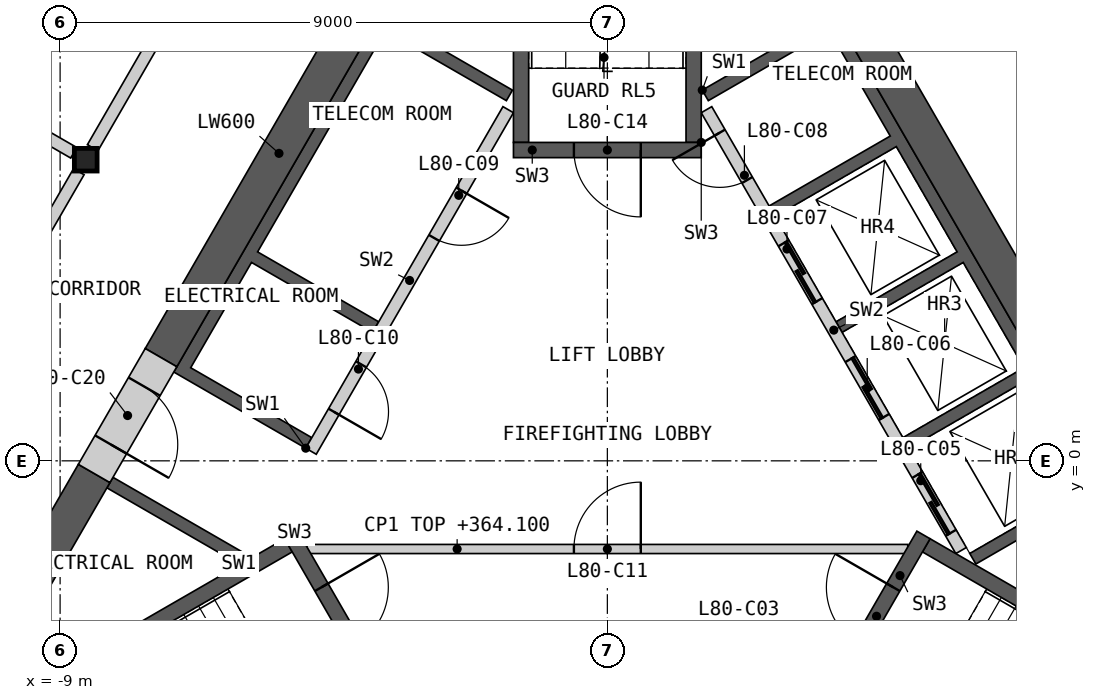
"""IFC4 building model, lengths in metres.
Left out: names, types, materials, properties, quantities, classifications, styles, units other than length and angle.
Written with IfcOpenShell. Run it as: python <this file> out.ifc"""

import sys

from ifc_helpers import new_model, si_unit, direction, frame, frame_2d, origin, origin_2d, place, context, subcontext, project, spatial, polyline, rectangle, i_section, outline, extrude, element, fill, save


model = new_model("IFC4")
c1 = context("Model", 3, precision=1e-05, world=origin(), true_north=direction((0.0, 1.0)))
c2 = subcontext(c1, "Body", "Model", "MODEL_VIEW")
j1 = project(units=[si_unit("LENGTHUNIT", "METRE"), si_unit("PLANEANGLEUNIT", "RADIAN")], contexts=[c1])
p1 = place(None, origin())
s1 = spatial("IfcSite", under=j1, at=p1, CompositionType="ELEMENT")
p2 = place(p1, origin())
s2 = spatial("IfcBuilding", under=s1, at=p2, CompositionType="ELEMENT")
p3 = place(p2, frame((0.0, 0.0, 361.0)))
s3 = spatial("IfcBuildingStorey", under=s2, at=p3, CompositionType="ELEMENT", Elevation=361.0)
p4 = place(p3, frame((-8.578, 4.953, 0.0), z_axis=(0.0, 0.0, 1.0), x_axis=(1.0, 0.0, 0.0)))
e1 = element("IfcColumn", 1, at=p4, inside=s3, PredefinedType="COLUMN", context=c2, shape_type="SweptSolid", body=[
    extrude(i_section(OverallWidth=0.374, OverallDepth=0.372, WebThickness=0.016, FlangeThickness=0.026, at=origin_2d()), origin(), (0.0, 0.0, 1.0), 3.4),
])
p5 = place(p3, origin())
e2 = element("IfcWall", 2, at=p5, inside=s3, PredefinedType="SHEAR", context=c2, shape_type="SweptSolid", body=[
    extrude(outline(polyline([(1.561, 6.097), (3.731, 7.35), (8.231, -0.444), (6.061, -1.697), (5.96, -1.524), (7.952, -0.374), (6.952, 1.358), (4.96, 0.208), (4.861, 0.381), (6.852, 1.531), (5.852, 3.263), (3.861, 2.113), (3.76, 2.287), (5.752, 3.437), (4.752, 5.169), (2.76, 4.019), (2.66, 4.192), (4.652, 5.342), (3.652, 7.074), (1.66, 5.924), (1.561, 6.097)])), origin(), (0.0, 0.0, 1.0), 3.1),
])
p6 = place(p3, frame((5.817, -1.476, 0.0), z_axis=(0.0, 0.0, 1.0), x_axis=(-0.500002616675, 0.866023893041, 0.0)))
e3 = element("IfcWall", 3, at=p6, inside=s3, PredefinedType="SOLIDWALL", context=c2, shape_type="SweptSolid", body=[
    extrude(rectangle(XDim=8.373, YDim=0.2, at=frame_2d((4.187, 0.0))), origin(), (0.0, 0.0, 1.0), 3.1),
])
p7 = place(p6, frame((0.337, 0.0, 0.0)))
e4 = element("IfcOpeningElement", 4, at=p7, cuts=e3, PredefinedType="OPENING", context=c2, shape_type="SweptSolid", body=[
    extrude(rectangle(XDim=1.1, YDim=2.1, at=frame_2d((0.55, 1.05))), frame((0.0, 0.11, 0.0), z_axis=(0.0, -1.0, 0.0), x_axis=(1.0, 0.0, 0.0)), (0.0, 0.0, 1.0), 0.22),
])
p8 = place(p6, frame((2.537, 0.0, 0.0)))
e5 = element("IfcOpeningElement", 5, at=p8, cuts=e3, PredefinedType="OPENING", context=c2, shape_type="SweptSolid", body=[
    extrude(rectangle(XDim=1.1, YDim=2.1, at=frame_2d((0.55, 1.05))), frame((0.0, 0.11, 0.0), z_axis=(0.0, -1.0, 0.0), x_axis=(1.0, 0.0, 0.0)), (0.0, 0.0, 1.0), 0.22),
])
p9 = place(p6, frame((4.737, 0.0, 0.0)))
e6 = element("IfcOpeningElement", 6, at=p9, cuts=e3, PredefinedType="OPENING", context=c2, shape_type="SweptSolid", body=[
    extrude(rectangle(XDim=1.1, YDim=2.1, at=frame_2d((0.55, 1.05))), frame((0.0, 0.11, 0.0), z_axis=(0.0, -1.0, 0.0), x_axis=(1.0, 0.0, 0.0)), (0.0, 0.0, 1.0), 0.22),
])
p10 = place(p6, frame((7.037, 0.0, 0.0)))
e7 = element("IfcOpeningElement", 7, at=p10, cuts=e3, PredefinedType="OPENING", context=c2, shape_type="SweptSolid", body=[
    extrude(rectangle(XDim=0.9, YDim=2.1, at=frame_2d((0.45, 1.05))), frame((0.0, 0.11, 0.0), z_axis=(0.0, -1.0, 0.0), x_axis=(1.0, 0.0, 0.0)), (0.0, 0.0, 1.0), 0.22),
])
p11 = place(p3, origin())
e8 = element("IfcWall", 8, at=p11, inside=s3, PredefinedType="SHEAR", context=c2, shape_type="SweptSolid", body=[
    extrude(outline(polyline([(-6.061, -1.697), (-8.231, -0.444), (-8.131, -0.271), (-5.96, -1.524), (-6.061, -1.697)])), origin(), (0.0, 0.0, 1.0), 3.1),
])
p12 = place(p3, origin())
e9 = element("IfcWall", 9, at=p12, inside=s3, PredefinedType="SHEAR", context=c2, shape_type="SweptSolid", body=[
    extrude(outline(polyline([(-4.96, 0.208), (-7.131, 1.461), (-3.731, 7.35), (-1.561, 6.097), (-1.66, 5.924), (-3.652, 7.074), (-5.752, 3.437), (-3.76, 2.287), (-3.861, 2.113), (-5.852, 3.263), (-6.852, 1.531), (-4.861, 0.381), (-4.96, 0.208)])), origin(), (0.0, 0.0, 1.0), 3.1),
])
p13 = place(p3, frame((-1.631, 5.776, 0.0), z_axis=(0.0, 0.0, 1.0), x_axis=(-0.499992876559, -0.866029516466, 0.0)))
e10 = element("IfcWall", 10, at=p13, inside=s3, PredefinedType="SOLIDWALL", context=c2, shape_type="SweptSolid", body=[
    extrude(rectangle(XDim=6.486, YDim=0.2, at=frame_2d((3.243, 0.0))), origin(), (0.0, 0.0, 1.0), 3.1),
])
p14 = place(p13, frame((1.537, 0.0, 0.0)))
e11 = element("IfcOpeningElement", 11, at=p14, cuts=e10, PredefinedType="OPENING", context=c2, shape_type="SweptSolid", body=[
    extrude(rectangle(XDim=0.9, YDim=2.1, at=frame_2d((0.45, 1.05))), frame((0.0, 0.11, 0.0), z_axis=(0.0, -1.0, 0.0), x_axis=(1.0, 0.0, 0.0)), (0.0, 0.0, 1.0), 0.22),
])
p15 = place(p13, frame((4.837, 0.0, 0.0)))
e12 = element("IfcOpeningElement", 12, at=p15, cuts=e10, PredefinedType="OPENING", context=c2, shape_type="SweptSolid", body=[
    extrude(rectangle(XDim=0.9, YDim=2.1, at=frame_2d((0.45, 1.05))), frame((0.0, 0.11, 0.0), z_axis=(0.0, -1.0, 0.0), x_axis=(1.0, 0.0, 0.0)), (0.0, 0.0, 1.0), 0.22),
])
p16 = place(p3, frame((-4.941, -1.45, 0.0), z_axis=(0.0, 0.0, 1.0), x_axis=(1.0, 0.0, 0.0)))
e13 = element("IfcWall", 13, at=p16, inside=s3, PredefinedType="PARTITIONING", context=c2, shape_type="SweptSolid", body=[
    extrude(rectangle(XDim=9.882, YDim=0.15, at=frame_2d((4.941, 0.0))), origin(), (0.0, 0.0, 1.0), 3.1),
])
p17 = place(p16, frame((4.391, 0.0, 0.0)))
e14 = element("IfcOpeningElement", 14, at=p17, cuts=e13, PredefinedType="OPENING", context=c2, shape_type="SweptSolid", body=[
    extrude(rectangle(XDim=1.1, YDim=2.1, at=frame_2d((0.55, 1.05))), frame((0.0, 0.085, 0.0), z_axis=(0.0, -1.0, 0.0), x_axis=(1.0, 0.0, 0.0)), (0.0, 0.0, 1.0), 0.17),
])
p18 = place(p3, origin())
e15 = element("IfcWall", 15, at=p18, inside=s3, PredefinedType="SHEAR", context=c2, shape_type="SweptSolid", body=[
    extrude(outline(polyline([(-5.307, -1.281), (-10.374, -4.206), (-10.032, -4.298), (-5.182, -1.498), (-5.307, -1.281)])), origin(), (0.0, 0.0, 1.0), 3.1),
])
p19 = place(p3, frame((-5.199, -1.219, 0.0), z_axis=(0.0, 0.0, 1.0), x_axis=(0.499982516597, -0.866035497597, 0.0)))
e16 = element("IfcWall", 16, at=p19, inside=s3, PredefinedType="SHEAR", context=c2, shape_type="SweptSolid", body=[
    extrude(rectangle(XDim=3.088, YDim=0.25, at=frame_2d((1.544, 0.0))), origin(), (0.0, 0.0, 1.0), 3.1),
])
p20 = place(p19, frame((0.994, 0.0, 0.0)))
e17 = element("IfcOpeningElement", 17, at=p20, cuts=e16, PredefinedType="OPENING", context=c2, shape_type="SweptSolid", body=[
    extrude(rectangle(XDim=1.1, YDim=2.1, at=frame_2d((0.55, 1.05))), frame((0.0, 0.135, 0.0), z_axis=(0.0, -1.0, 0.0), x_axis=(1.0, 0.0, 0.0)), (0.0, 0.0, 1.0), 0.27),
])
p21 = place(p3, origin())
e18 = element("IfcWall", 18, at=p21, inside=s3, PredefinedType="SHEAR", context=c2, shape_type="SweptSolid", body=[
    extrude(outline(polyline([(10.032, -4.298), (10.374, -4.206), (5.307, -1.281), (5.182, -1.498), (10.032, -4.298)])), origin(), (0.0, 0.0, 1.0), 3.1),
])
p22 = place(p3, frame((3.655, -3.893, 0.0), z_axis=(0.0, 0.0, 1.0), x_axis=(0.499982516597, 0.866035497597, 0.0)))
e19 = element("IfcWall", 19, at=p22, inside=s3, PredefinedType="SHEAR", context=c2, shape_type="SweptSolid", body=[
    extrude(rectangle(XDim=3.088, YDim=0.25, at=frame_2d((1.544, 0.0))), origin(), (0.0, 0.0, 1.0), 3.1),
])
p23 = place(p22, frame((0.994, 0.0, 0.0)))
e20 = element("IfcOpeningElement", 20, at=p23, cuts=e19, PredefinedType="OPENING", context=c2, shape_type="SweptSolid", body=[
    extrude(rectangle(XDim=1.1, YDim=2.1, at=frame_2d((0.55, 1.05))), frame((0.0, 0.135, 0.0), z_axis=(0.0, -1.0, 0.0), x_axis=(1.0, 0.0, 0.0)), (0.0, 0.0, 1.0), 0.27),
])
p24 = place(p3, origin())
e21 = element("IfcWall", 21, at=p24, inside=s3, PredefinedType="SHEAR", context=c2, shape_type="SweptSolid", body=[
    extrude(outline(polyline([(1.544, 5.237), (1.544, 11.087), (1.294, 10.837), (1.294, 5.237), (1.544, 5.237)])), origin(), (0.0, 0.0, 1.0), 3.1),
])
p25 = place(p3, origin())
e22 = element("IfcWall", 22, at=p25, inside=s3, PredefinedType="SHEAR", context=c2, shape_type="SweptSolid", body=[
    extrude(outline(polyline([(-1.294, 10.837), (-1.544, 11.087), (-1.544, 5.237), (-1.294, 5.237), (-1.294, 10.837)])), origin(), (0.0, 0.0, 1.0), 3.1),
])
p26 = place(p3, frame((1.544, 5.112, 0.0), z_axis=(0.0, 0.0, 1.0), x_axis=(-1.0, 0.0, 0.0)))
e23 = element("IfcWall", 23, at=p26, inside=s3, PredefinedType="SHEAR", context=c2, shape_type="SweptSolid", body=[
    extrude(rectangle(XDim=3.088, YDim=0.25, at=frame_2d((1.544, 0.0))), origin(), (0.0, 0.0, 1.0), 3.1),
])
p27 = place(p26, frame((0.994, 0.0, 0.0)))
e24 = element("IfcOpeningElement", 24, at=p27, cuts=e23, PredefinedType="OPENING", context=c2, shape_type="SweptSolid", body=[
    extrude(rectangle(XDim=1.1, YDim=2.1, at=frame_2d((0.55, 1.05))), frame((0.0, 0.135, 0.0), z_axis=(0.0, -1.0, 0.0), x_axis=(1.0, 0.0, 0.0)), (0.0, 0.0, 1.0), 0.27),
])
p28 = place(p3, frame((8.686, -0.634, 0.0), z_axis=(0.0, 0.0, 1.0), x_axis=(-0.50001836461, 0.866014800712, 0.0)))
e25 = element("IfcWall", 25, at=p28, inside=s3, PredefinedType="SHEAR", context=c2, shape_type="SweptSolid", body=[
    extrude(rectangle(XDim=10.451, YDim=0.6, at=frame_2d((5.225, 0.0))), origin(), (0.0, 0.0, 1.0), 3.1),
])
p29 = place(p3, frame((-3.461, 8.417, 0.0), z_axis=(0.0, 0.0, 1.0), x_axis=(-0.50000391502, -0.866023143435, 0.0)))
e26 = element("IfcWall", 26, at=p29, inside=s3, PredefinedType="SHEAR", context=c2, shape_type="SweptSolid", body=[
    extrude(rectangle(XDim=7.759, YDim=0.6, at=frame_2d((3.879, 0.0))), origin(), (0.0, 0.0, 1.0), 3.1),
])
p30 = place(p3, frame((-8.44, -0.208, 0.0), z_axis=(0.0, 0.0, 1.0), x_axis=(-0.500007425856, -0.866021116422, 0.0)))
e27 = element("IfcWall", 27, at=p30, inside=s3, PredefinedType="SHEAR", context=c2, shape_type="SweptSolid", body=[
    extrude(rectangle(XDim=4.969, YDim=0.6, at=frame_2d((2.484, 0.0))), origin(), (0.0, 0.0, 1.0), 3.1),
])
p31 = place(p3, frame((-7.34, 1.698, 0.0), z_axis=(0.0, 0.0, 1.0), x_axis=(-0.50002983664, -0.866008176907, 0.0)))
e28 = element("IfcWall", 28, at=p31, inside=s3, PredefinedType="SHEAR", context=c2, shape_type="SweptSolid", body=[
    extrude(rectangle(XDim=2.2, YDim=0.6, at=frame_2d((1.1, 0.0))), origin(), (0.0, 0.0, 1.0), 3.1),
])
p32 = place(p31, frame((0.55, 0.0, 0.0)))
e29 = element("IfcOpeningElement", 29, at=p32, cuts=e28, PredefinedType="OPENING", context=c2, shape_type="SweptSolid", body=[
    extrude(rectangle(XDim=1.1, YDim=2.1, at=frame_2d((0.55, 1.05))), frame((0.0, 0.31, 0.0), z_axis=(0.0, -1.0, 0.0), x_axis=(1.0, 0.0, 0.0)), (0.0, 0.0, 1.0), 0.62),
])
p33 = place(p3, frame((-8.465, 5.15, 0.0), z_axis=(0.0, 0.0, 1.0), x_axis=(0.499992155518, 0.866029932751, 0.0)))
e30 = element("IfcWall", 30, at=p33, inside=s3, PredefinedType="PARTITIONING", context=c2, shape_type="SweptSolid", body=[
    extrude(rectangle(XDim=8.123, YDim=0.2, at=frame_2d((4.062, 0.0))), origin(), (0.0, 0.0, 1.0), 3.1),
])
p34 = place(p33, frame((3.587, 0.0, 0.0)))
e31 = element("IfcOpeningElement", 31, at=p34, cuts=e30, PredefinedType="OPENING", context=c2, shape_type="SweptSolid", body=[
    extrude(rectangle(XDim=0.95, YDim=2.1, at=frame_2d((0.475, 1.05))), frame((0.0, 0.11, 0.0), z_axis=(0.0, -1.0, 0.0), x_axis=(1.0, 0.0, 0.0)), (0.0, 0.0, 1.0), 0.22),
])
p35 = place(p3, frame((4.403, 12.185, 0.0), z_axis=(0.0, 0.0, 1.0), x_axis=(0.499992155518, -0.866029932751, 0.0)))
e32 = element("IfcWall", 32, at=p35, inside=s3, PredefinedType="PARTITIONING", context=c2, shape_type="SweptSolid", body=[
    extrude(rectangle(XDim=8.123, YDim=0.2, at=frame_2d((4.062, 0.0))), origin(), (0.0, 0.0, 1.0), 3.1),
])
p36 = place(p35, frame((3.762, 0.0, 0.0)))
e33 = element("IfcOpeningElement", 33, at=p36, cuts=e32, PredefinedType="OPENING", context=c2, shape_type="SweptSolid", body=[
    extrude(rectangle(XDim=1.0, YDim=2.1, at=frame_2d((0.5, 1.05))), frame((0.0, 0.11, 0.0), z_axis=(0.0, -1.0, 0.0), x_axis=(1.0, 0.0, 0.0)), (0.0, 0.0, 1.0), 0.22),
])
p37 = place(p3, frame((-12.754, -2.279, 0.0), z_axis=(0.0, 0.0, 1.0), x_axis=(0.500001682468, 0.866024432409, 0.0)))
e34 = element("IfcWall", 34, at=p37, inside=s3, PredefinedType="PARTITIONING", context=c2, shape_type="SweptSolid", body=[
    extrude(rectangle(XDim=8.124, YDim=0.2, at=frame_2d((4.062, 0.0))), origin(), (0.0, 0.0, 1.0), 3.1),
])
p38 = place(p37, frame((3.762, 0.0, 0.0)))
e35 = element("IfcOpeningElement", 35, at=p38, cuts=e34, PredefinedType="OPENING", context=c2, shape_type="SweptSolid", body=[
    extrude(rectangle(XDim=1.0, YDim=2.1, at=frame_2d((0.5, 1.05))), frame((0.0, 0.11, 0.0), z_axis=(0.0, -1.0, 0.0), x_axis=(1.0, 0.0, 0.0)), (0.0, 0.0, 1.0), 0.22),
])
p39 = place(p3, frame((-11.473, 6.74, 0.0), z_axis=(0.0, 0.0, 1.0), x_axis=(0.499993542657, 0.866029131901, 0.0)))
e36 = element("IfcWall", 36, at=p39, inside=s3, PredefinedType="PARTITIONING", context=c2, shape_type="SweptSolid", body=[
    extrude(rectangle(XDim=14.994, YDim=0.2, at=frame_2d((7.497, 0.0))), origin(), (0.0, 0.0, 1.0), 2.33),
])
p40 = place(p39, frame((10.383, 0.0, 0.0)))
e37 = element("IfcOpeningElement", 37, at=p40, cuts=e36, PredefinedType="OPENING", context=c2, shape_type="SweptSolid", body=[
    extrude(rectangle(XDim=0.95, YDim=2.1, at=frame_2d((0.475, 1.05))), frame((0.0, 0.11, 0.0), z_axis=(0.0, -1.0, 0.0), x_axis=(1.0, 0.0, 0.0)), (0.0, 0.0, 1.0), 0.22),
])
p41 = place(p3, frame((-18.869, 10.894, 0.0), z_axis=(0.0, 0.0, 1.0), x_axis=(0.866023724155, -0.500002909193, 0.0)))
e38 = element("IfcWall", 38, at=p41, inside=s3, PredefinedType="PARTITIONING", context=c2, shape_type="SweptSolid", body=[
    extrude(rectangle(XDim=11.655, YDim=0.2, at=frame_2d((5.827, 0.0))), origin(), (0.0, 0.0, 1.0), 2.33),
])
p42 = place(p7, origin())
e39 = element("IfcDoor", 39, at=p42, inside=s3, OperationType="SLIDING_TO_LEFT", PredefinedType="DOOR", context=c2, shape_type="SweptSolid", body=[
    extrude(rectangle(XDim=1.1, YDim=2.1, at=frame_2d((0.55, 1.05))), frame((0.0, 0.025, 0.0), z_axis=(0.0, -1.0, 0.0), x_axis=(1.0, 0.0, 0.0)), (0.0, 0.0, 1.0), 0.05),
])
fill(e4, e39)
p43 = place(p8, origin())
e40 = element("IfcDoor", 40, at=p43, inside=s3, OperationType="SLIDING_TO_LEFT", PredefinedType="DOOR", context=c2, shape_type="SweptSolid", body=[
    extrude(rectangle(XDim=1.1, YDim=2.1, at=frame_2d((0.55, 1.05))), frame((0.0, 0.025, 0.0), z_axis=(0.0, -1.0, 0.0), x_axis=(1.0, 0.0, 0.0)), (0.0, 0.0, 1.0), 0.05),
])
fill(e5, e40)
p44 = place(p9, origin())
e41 = element("IfcDoor", 41, at=p44, inside=s3, OperationType="SLIDING_TO_LEFT", PredefinedType="DOOR", context=c2, shape_type="SweptSolid", body=[
    extrude(rectangle(XDim=1.1, YDim=2.1, at=frame_2d((0.55, 1.05))), frame((0.0, 0.025, 0.0), z_axis=(0.0, -1.0, 0.0), x_axis=(1.0, 0.0, 0.0)), (0.0, 0.0, 1.0), 0.05),
])
fill(e6, e41)
p45 = place(p10, origin())
e42 = element("IfcDoor", 42, at=p45, inside=s3, OperationType="SINGLE_SWING_RIGHT", PredefinedType="DOOR", context=c2, shape_type="SweptSolid", body=[
    extrude(rectangle(XDim=0.9, YDim=2.1, at=frame_2d((0.45, 1.05))), frame((0.0, 0.025, 0.0), z_axis=(0.0, -1.0, 0.0), x_axis=(1.0, 0.0, 0.0)), (0.0, 0.0, 1.0), 0.05),
])
fill(e7, e42)
p46 = place(p14, origin())
e43 = element("IfcDoor", 43, at=p46, inside=s3, OperationType="SINGLE_SWING_LEFT", PredefinedType="DOOR", context=c2, shape_type="SweptSolid", body=[
    extrude(rectangle(XDim=0.9, YDim=2.1, at=frame_2d((0.45, 1.05))), frame((0.0, 0.025, 0.0), z_axis=(0.0, -1.0, 0.0), x_axis=(1.0, 0.0, 0.0)), (0.0, 0.0, 1.0), 0.05),
])
fill(e11, e43)
p47 = place(p15, origin())
e44 = element("IfcDoor", 44, at=p47, inside=s3, OperationType="SINGLE_SWING_RIGHT", PredefinedType="DOOR", context=c2, shape_type="SweptSolid", body=[
    extrude(rectangle(XDim=0.9, YDim=2.1, at=frame_2d((0.45, 1.05))), frame((0.0, 0.025, 0.0), z_axis=(0.0, -1.0, 0.0), x_axis=(1.0, 0.0, 0.0)), (0.0, 0.0, 1.0), 0.05),
])
fill(e12, e44)
p48 = place(p17, origin())
e45 = element("IfcDoor", 45, at=p48, inside=s3, OperationType="SINGLE_SWING_RIGHT", PredefinedType="DOOR", context=c2, shape_type="SweptSolid", body=[
    extrude(rectangle(XDim=1.1, YDim=2.1, at=frame_2d((0.55, 1.05))), frame((0.0, 0.025, 0.0), z_axis=(0.0, -1.0, 0.0), x_axis=(1.0, 0.0, 0.0)), (0.0, 0.0, 1.0), 0.05),
])
fill(e14, e45)
p49 = place(p20, origin())
e46 = element("IfcDoor", 46, at=p49, inside=s3, OperationType="SINGLE_SWING_LEFT", PredefinedType="DOOR", context=c2, shape_type="SweptSolid", body=[
    extrude(rectangle(XDim=1.1, YDim=2.1, at=frame_2d((0.55, 1.05))), frame((0.0, 0.025, 0.0), z_axis=(0.0, -1.0, 0.0), x_axis=(1.0, 0.0, 0.0)), (0.0, 0.0, 1.0), 0.05),
])
fill(e17, e46)
p50 = place(p23, origin())
e47 = element("IfcDoor", 47, at=p50, inside=s3, OperationType="SINGLE_SWING_RIGHT", PredefinedType="DOOR", context=c2, shape_type="SweptSolid", body=[
    extrude(rectangle(XDim=1.1, YDim=2.1, at=frame_2d((0.55, 1.05))), frame((0.0, 0.025, 0.0), z_axis=(0.0, -1.0, 0.0), x_axis=(1.0, 0.0, 0.0)), (0.0, 0.0, 1.0), 0.05),
])
fill(e20, e47)
p51 = place(p27, origin())
e48 = element("IfcDoor", 48, at=p51, inside=s3, OperationType="SINGLE_SWING_LEFT", PredefinedType="DOOR", context=c2, shape_type="SweptSolid", body=[
    extrude(rectangle(XDim=1.1, YDim=2.1, at=frame_2d((0.55, 1.05))), frame((0.0, 0.025, 0.0), z_axis=(0.0, -1.0, 0.0), x_axis=(1.0, 0.0, 0.0)), (0.0, 0.0, 1.0), 0.05),
])
fill(e24, e48)
p52 = place(p32, origin())
e49 = element("IfcDoor", 49, at=p52, inside=s3, OperationType="SINGLE_SWING_RIGHT", PredefinedType="DOOR", context=c2, shape_type="SweptSolid", body=[
    extrude(rectangle(XDim=1.1, YDim=2.1, at=frame_2d((0.55, 1.05))), frame((0.0, 0.055, 0.0), z_axis=(0.0, -1.0, 0.0), x_axis=(1.0, 0.0, 0.0)), (0.0, 0.0, 1.0), 0.05),
])
fill(e29, e49)
save(model, sys.argv[1])
